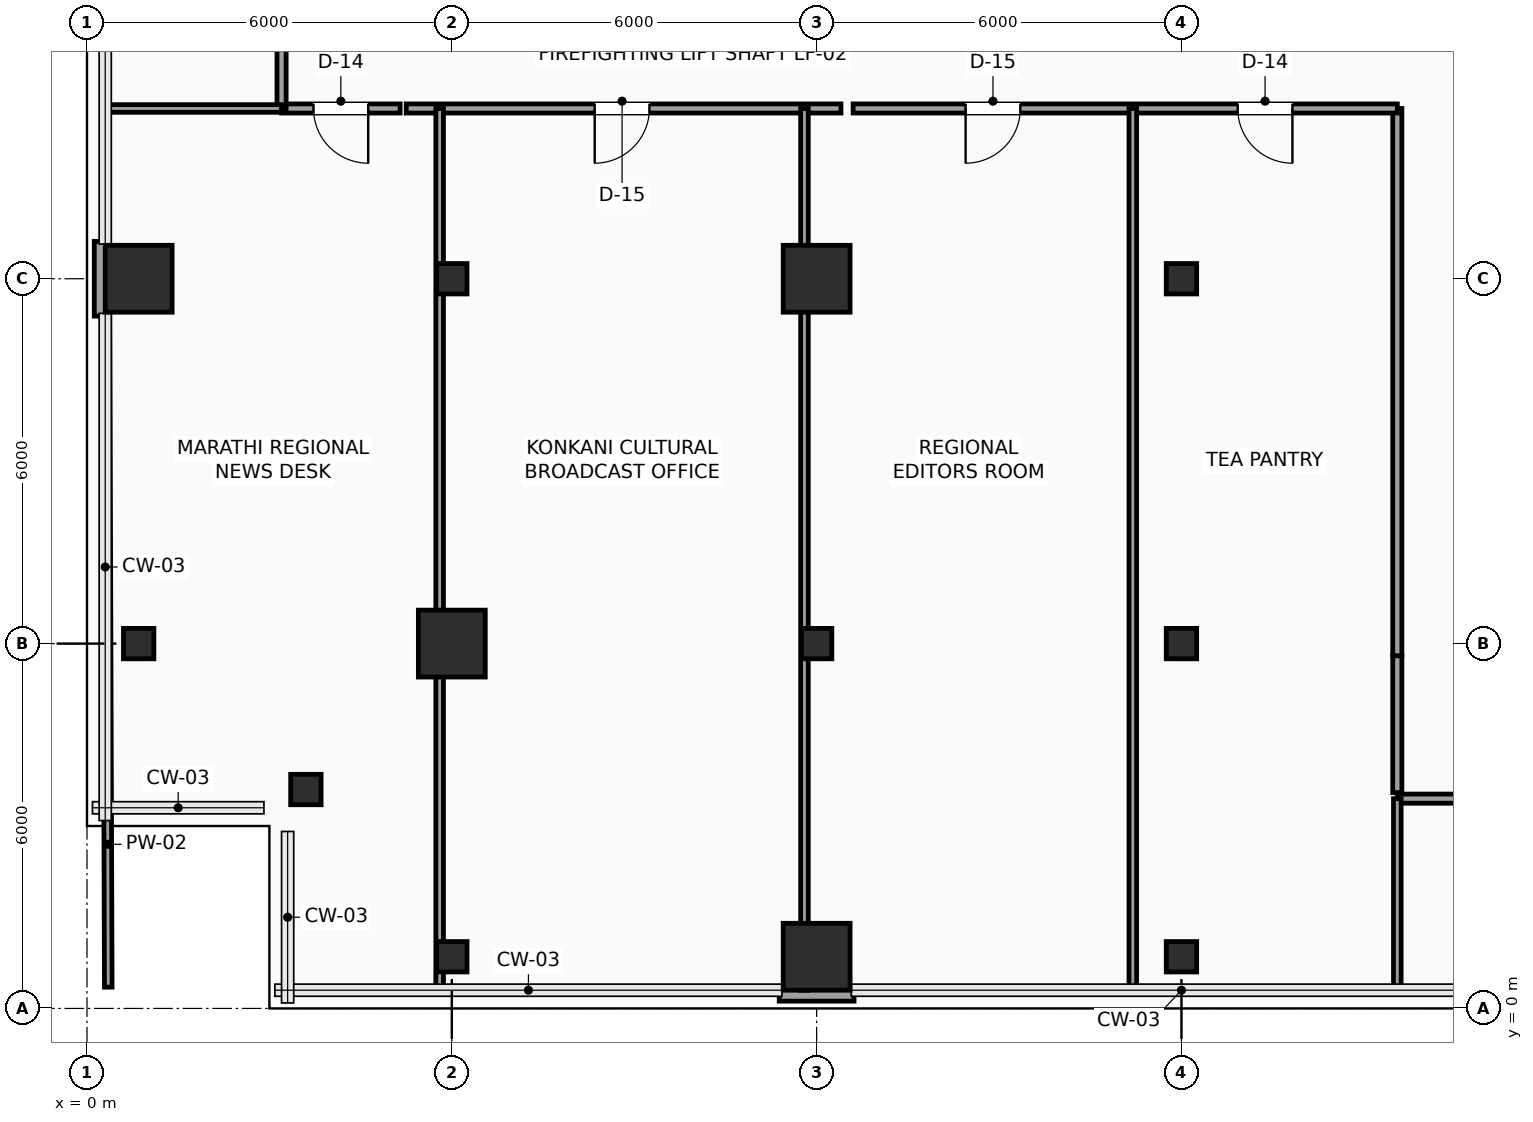
"""IFC4 building model, lengths in metres.
Left out: names, types, materials, properties, quantities, classifications, styles, units other than length and angle.
Written with IfcOpenShell. Run it as: python <this file> out.ifc"""

import sys

from ifc_helpers import new_model, si_unit, direction, frame, frame_2d, origin, origin_2d, place, context, subcontext, project, spatial, rectangle, hollow_rectangle, extrude, element, fill, save


model = new_model("IFC4")
c1 = context("Model", 3, precision=1e-05, world=origin(), true_north=direction((0.0, 1.0)))
c2 = subcontext(c1, "Body", "Model", "MODEL_VIEW")
j1 = project(units=[si_unit("LENGTHUNIT", "METRE"), si_unit("PLANEANGLEUNIT", "RADIAN")], contexts=[c1])
p1 = place(None, origin())
s1 = spatial("IfcSite", under=j1, at=p1, CompositionType="ELEMENT")
p2 = place(p1, origin())
s2 = spatial("IfcBuilding", under=s1, at=p2, CompositionType="ELEMENT")
p3 = place(p2, frame((0.0, 0.0, 103.35)))
s3 = spatial("IfcBuildingStorey", under=s2, at=p3, CompositionType="ELEMENT", Elevation=103.35)
for number, where, z_axis, x_axis in (
    (1, (3.6, 3.6, 0.0), (0.0, 0.0, 1.0), (1.0, 0.0, 0.0)),
    (2, (0.85, 6.0, 0.0), (0.0, 0.0, 1.0), (1.0, 0.0, 0.0)),
):
    element("IfcColumn", number, at=place(p3, frame(where, z_axis=z_axis, x_axis=x_axis)), inside=s3, PredefinedType="COLUMN", context=c2, shape_type="SweptSolid", body=[
        extrude(hollow_rectangle(XDim=0.5, YDim=0.5, WallThickness=0.025, InnerFilletRadius=0.025, OuterFilletRadius=0.04, at=origin_2d()), origin(), (0.0, 0.0, 1.0), 3.75),
    ])
p4 = place(p3, frame((0.85, 12.0, 0.0), z_axis=(0.0, 0.0, 1.0), x_axis=(1.0, 0.0, 0.0)))
e3 = element("IfcColumn", 3, at=p4, inside=s3, PredefinedType="COLUMN", context=c2, shape_type="SweptSolid", body=[
    extrude(rectangle(XDim=1.1, YDim=1.1, at=origin_2d()), origin(), (0.0, 0.0, 1.0), 3.75),
])
p5 = place(p3, frame((6.0, 0.85, 0.0), z_axis=(0.0, 0.0, 1.0), x_axis=(1.0, 0.0, 0.0)))
e4 = element("IfcColumn", 4, at=p5, inside=s3, PredefinedType="COLUMN", context=c2, shape_type="SweptSolid", body=[
    extrude(hollow_rectangle(XDim=0.5, YDim=0.5, WallThickness=0.025, InnerFilletRadius=0.025, OuterFilletRadius=0.04, at=origin_2d()), origin(), (0.0, 0.0, 1.0), 3.75),
])
p6 = place(p3, frame((6.0, 6.0, 0.0), z_axis=(0.0, 0.0, 1.0), x_axis=(1.0, 0.0, 0.0)))
e5 = element("IfcColumn", 5, at=p6, inside=s3, PredefinedType="COLUMN", context=c2, shape_type="SweptSolid", body=[
    extrude(rectangle(XDim=1.1, YDim=1.1, at=origin_2d()), origin(), (0.0, 0.0, 1.0), 3.75),
])
p7 = place(p3, frame((6.0, 12.0, 0.0), z_axis=(0.0, 0.0, 1.0), x_axis=(1.0, 0.0, 0.0)))
e6 = element("IfcColumn", 6, at=p7, inside=s3, PredefinedType="COLUMN", context=c2, shape_type="SweptSolid", body=[
    extrude(hollow_rectangle(XDim=0.5, YDim=0.5, WallThickness=0.025, InnerFilletRadius=0.025, OuterFilletRadius=0.04, at=origin_2d()), origin(), (0.0, 0.0, 1.0), 3.75),
])
p8 = place(p3, frame((12.0, 0.85, 0.0), z_axis=(0.0, 0.0, 1.0), x_axis=(1.0, 0.0, 0.0)))
e7 = element("IfcColumn", 7, at=p8, inside=s3, PredefinedType="COLUMN", context=c2, shape_type="SweptSolid", body=[
    extrude(rectangle(XDim=1.1, YDim=1.1, at=origin_2d()), origin(), (0.0, 0.0, 1.0), 3.75),
])
p9 = place(p3, frame((12.0, 6.0, 0.0), z_axis=(0.0, 0.0, 1.0), x_axis=(1.0, 0.0, 0.0)))
e8 = element("IfcColumn", 8, at=p9, inside=s3, PredefinedType="COLUMN", context=c2, shape_type="SweptSolid", body=[
    extrude(hollow_rectangle(XDim=0.5, YDim=0.5, WallThickness=0.025, InnerFilletRadius=0.025, OuterFilletRadius=0.04, at=origin_2d()), origin(), (0.0, 0.0, 1.0), 3.75),
])
p10 = place(p3, frame((12.0, 12.0, 0.0), z_axis=(0.0, 0.0, 1.0), x_axis=(1.0, 0.0, 0.0)))
e9 = element("IfcColumn", 9, at=p10, inside=s3, PredefinedType="COLUMN", context=c2, shape_type="SweptSolid", body=[
    extrude(rectangle(XDim=1.1, YDim=1.1, at=origin_2d()), origin(), (0.0, 0.0, 1.0), 3.75),
])
for number, where, z_axis, x_axis in (
    (10, (18.0, 0.85, 0.0), (0.0, 0.0, 1.0), (1.0, 0.0, 0.0)),
    (11, (18.0, 6.0, 0.0), (0.0, 0.0, 1.0), (1.0, 0.0, 0.0)),
    (12, (18.0, 12.0, 0.0), (0.0, 0.0, 1.0), (1.0, 0.0, 0.0)),
):
    element("IfcColumn", number, at=place(p3, frame(where, z_axis=z_axis, x_axis=x_axis)), inside=s3, PredefinedType="COLUMN", context=c2, shape_type="SweptSolid", body=[
        extrude(hollow_rectangle(XDim=0.5, YDim=0.5, WallThickness=0.025, InnerFilletRadius=0.025, OuterFilletRadius=0.04, at=origin_2d()), origin(), (0.0, 0.0, 1.0), 3.75),
    ])
for number, where, z_axis, x_axis in (
    (13, (0.24, 11.385, 0.0), (0.0, 0.0, 1.0), (0.0, 1.0, 0.0)),
    (14, (12.615, 0.24, 0.0), (0.0, 0.0, 1.0), (-1.0, 0.0, 0.0)),
):
    element("IfcWall", number, at=place(p3, frame(where, z_axis=z_axis, x_axis=x_axis)), inside=s3, PredefinedType="SOLIDWALL", context=c2, shape_type="SweptSolid", body=[
        extrude(rectangle(XDim=1.23, YDim=0.24, at=frame_2d((0.615, 0.0))), origin(), (0.0, 0.0, 1.0), 3.525),
    ])
p11 = place(p3, frame((36.15, 3.45, 0.0), z_axis=(0.0, 0.0, 1.0), x_axis=(-1.0, 0.0, 0.0)))
e15 = element("IfcWall", 15, at=p11, inside=s3, PredefinedType="PARTITIONING", context=c2, shape_type="SweptSolid", body=[
    extrude(rectangle(XDim=14.6, YDim=0.15, at=frame_2d((7.3, 0.0))), origin(), (0.0, 0.0, 1.0), 3.067),
])
p12 = place(p11, frame((11.325, 0.0, 0.0)))
e16 = element("IfcOpeningElement", 16, at=p12, cuts=e15, PredefinedType="OPENING", context=c2, shape_type="SweptSolid", body=[
    extrude(rectangle(XDim=0.9, YDim=2.1, at=frame_2d((0.45, 1.05))), frame((0.0, 0.085, 0.0), z_axis=(0.0, -1.0, 0.0), x_axis=(1.0, 0.0, 0.0)), (0.0, 0.0, 1.0), 0.17),
])
p13 = place(p11, frame((5.7, 0.0, 0.0)))
e17 = element("IfcOpeningElement", 17, at=p13, cuts=e15, PredefinedType="OPENING", context=c2, shape_type="SweptSolid", body=[
    extrude(rectangle(XDim=0.9, YDim=2.1, at=frame_2d((0.45, 1.05))), frame((0.0, 0.085, 0.0), z_axis=(0.0, -1.0, 0.0), x_axis=(1.0, 0.0, 0.0)), (0.0, 0.0, 1.0), 0.17),
])
p14 = place(p3, frame((21.55, 3.55, 0.0), z_axis=(0.0, 0.0, 1.0), x_axis=(0.0, 1.0, 0.0)))
e18 = element("IfcWall", 18, at=p14, inside=s3, PredefinedType="PARTITIONING", context=c2, shape_type="SweptSolid", body=[
    extrude(rectangle(XDim=2.25, YDim=0.15, at=frame_2d((1.125, 0.0))), origin(), (0.0, 0.0, 1.0), 3.525),
])
p15 = place(p3, frame((21.55, 5.8, 0.0), z_axis=(0.0, 0.0, 1.0), x_axis=(0.0, 1.0, 0.0)))
e19 = element("IfcWall", 19, at=p15, inside=s3, PredefinedType="PARTITIONING", context=c2, shape_type="SweptSolid", body=[
    extrude(rectangle(XDim=9.0, YDim=0.15, at=frame_2d((4.5, 0.0))), origin(), (0.0, 0.0, 1.0), 3.525),
])
p16 = place(p3, frame((21.55, 14.8, 0.0), z_axis=(0.0, 0.0, 1.0), x_axis=(-1.0, 0.0, 0.0)))
e20 = element("IfcWall", 20, at=p16, inside=s3, PredefinedType="PARTITIONING", context=c2, shape_type="SweptSolid", body=[
    extrude(rectangle(XDim=8.95, YDim=0.15, at=frame_2d((4.475, 0.0))), origin(), (0.0, 0.0, 1.0), 3.067),
])
p17 = place(p16, frame((6.2, 0.0, 0.0)))
e21 = element("IfcOpeningElement", 21, at=p17, cuts=e20, PredefinedType="OPENING", context=c2, shape_type="SweptSolid", body=[
    extrude(rectangle(XDim=0.9, YDim=2.1, at=frame_2d((0.45, 1.05))), frame((0.0, 0.085, 0.0), z_axis=(0.0, -1.0, 0.0), x_axis=(1.0, 0.0, 0.0)), (0.0, 0.0, 1.0), 0.17),
])
p18 = place(p16, frame((1.725, 0.0, 0.0)))
e22 = element("IfcOpeningElement", 22, at=p18, cuts=e20, PredefinedType="OPENING", context=c2, shape_type="SweptSolid", body=[
    extrude(rectangle(XDim=0.9, YDim=2.1, at=frame_2d((0.45, 1.05))), frame((0.0, 0.085, 0.0), z_axis=(0.0, -1.0, 0.0), x_axis=(1.0, 0.0, 0.0)), (0.0, 0.0, 1.0), 0.17),
])
p19 = place(p3, frame((12.4, 14.8, 0.0), z_axis=(0.0, 0.0, 1.0), x_axis=(-1.0, 0.0, 0.0)))
e23 = element("IfcWall", 23, at=p19, inside=s3, PredefinedType="PARTITIONING", context=c2, shape_type="SweptSolid", body=[
    extrude(rectangle(XDim=7.15, YDim=0.15, at=frame_2d((3.575, 0.0))), origin(), (0.0, 0.0, 1.0), 3.067),
])
p20 = place(p19, frame((3.15, 0.0, 0.0)))
e24 = element("IfcOpeningElement", 24, at=p20, cuts=e23, PredefinedType="OPENING", context=c2, shape_type="SweptSolid", body=[
    extrude(rectangle(XDim=0.9, YDim=2.1, at=frame_2d((0.45, 1.05))), frame((0.0, 0.085, 0.0), z_axis=(0.0, -1.0, 0.0), x_axis=(1.0, 0.0, 0.0)), (0.0, 0.0, 1.0), 0.17),
])
p21 = place(p3, frame((5.15, 14.8, 0.0), z_axis=(0.0, 0.0, 1.0), x_axis=(-1.0, 0.0, 0.0)))
e25 = element("IfcWall", 25, at=p21, inside=s3, PredefinedType="PARTITIONING", context=c2, shape_type="SweptSolid", body=[
    extrude(rectangle(XDim=1.95, YDim=0.15, at=frame_2d((0.975, 0.0))), origin(), (0.0, 0.0, 1.0), 3.067),
])
p22 = place(p21, frame((0.525, 0.0, 0.0)))
e26 = element("IfcOpeningElement", 26, at=p22, cuts=e25, PredefinedType="OPENING", context=c2, shape_type="SweptSolid", body=[
    extrude(rectangle(XDim=0.9, YDim=2.1, at=frame_2d((0.45, 1.05))), frame((0.0, 0.085, 0.0), z_axis=(0.0, -1.0, 0.0), x_axis=(1.0, 0.0, 0.0)), (0.0, 0.0, 1.0), 0.17),
])
p23 = place(p3, frame((3.2, 14.8, 0.0), z_axis=(0.0, 0.0, 1.0), x_axis=(0.0, 1.0, 0.0)))
e27 = element("IfcWall", 27, at=p23, inside=s3, PredefinedType="PARTITIONING", context=c2, shape_type="SweptSolid", body=[
    extrude(rectangle(XDim=15.45, YDim=0.15, at=frame_2d((7.725, 0.0))), origin(), (0.0, 0.0, 1.0), 3.525),
])
p24 = place(p23, frame((2.65, 0.0, 0.0)))
e28 = element("IfcOpeningElement", 28, at=p24, cuts=e27, PredefinedType="OPENING", context=c2, shape_type="SweptSolid", body=[
    extrude(rectangle(XDim=0.9, YDim=2.1, at=frame_2d((0.45, 1.05))), frame((0.0, 0.085, 0.0), z_axis=(0.0, -1.0, 0.0), x_axis=(1.0, 0.0, 0.0)), (0.0, 0.0, 1.0), 0.17),
])
p25 = place(p23, frame((8.85, 0.0, 0.0)))
e29 = element("IfcOpeningElement", 29, at=p25, cuts=e27, PredefinedType="OPENING", context=c2, shape_type="SweptSolid", body=[
    extrude(rectangle(XDim=0.9, YDim=2.1, at=frame_2d((0.45, 1.05))), frame((0.0, 0.085, 0.0), z_axis=(0.0, -1.0, 0.0), x_axis=(1.0, 0.0, 0.0)), (0.0, 0.0, 1.0), 0.17),
])
p26 = place(p23, frame((13.475, 0.0, 0.0)))
e30 = element("IfcOpeningElement", 30, at=p26, cuts=e27, PredefinedType="OPENING", context=c2, shape_type="SweptSolid", body=[
    extrude(rectangle(XDim=0.9, YDim=2.1, at=frame_2d((0.45, 1.05))), frame((0.0, 0.085, 0.0), z_axis=(0.0, -1.0, 0.0), x_axis=(1.0, 0.0, 0.0)), (0.0, 0.0, 1.0), 0.17),
])
p27 = place(p3, frame((0.35, 0.35, 0.0), z_axis=(0.0, 0.0, 1.0), x_axis=(-0.003473507221, 0.999993967356, 0.0)))
e31 = element("IfcWall", 31, at=p27, inside=s3, PredefinedType="PARTITIONING", context=c2, shape_type="SweptSolid", body=[
    extrude(rectangle(XDim=11.035, YDim=0.125, at=frame_2d((5.518, 0.0))), origin(), (0.0, 0.0, 1.0), 3.525),
])
p28 = place(p3, frame((0.308, 12.615, 0.0), z_axis=(0.0, 0.0, 1.0), x_axis=(-0.003463666374, 0.99999400149, 0.0)))
e32 = element("IfcWall", 32, at=p28, inside=s3, PredefinedType="PARTITIONING", context=c2, shape_type="SweptSolid", body=[
    extrude(rectangle(XDim=2.185, YDim=0.125, at=frame_2d((1.093, 0.0))), origin(), (0.0, 0.0, 1.0), 3.525),
])
for number, where, z_axis, x_axis in (
    (33, (5.8, 0.3, 0.0), (0.0, 0.0, 1.0), (0.0, 1.0, 0.0)),
    (34, (11.8, 0.3, 0.0), (0.0, 0.0, 1.0), (0.0, 1.0, 0.0)),
):
    element("IfcWall", number, at=place(p3, frame(where, z_axis=z_axis, x_axis=x_axis)), inside=s3, PredefinedType="PARTITIONING", context=c2, shape_type="SweptSolid", body=[
        extrude(rectangle(XDim=14.5, YDim=0.125, at=frame_2d((7.25, 0.0))), origin(), (0.0, 0.0, 1.0), 3.017),
    ])
p29 = place(p3, frame((17.2, 0.3, 0.0), z_axis=(0.0, 0.0, 1.0), x_axis=(0.0, 1.0, 0.0)))
e35 = element("IfcWall", 35, at=p29, inside=s3, PredefinedType="PARTITIONING", context=c2, shape_type="SweptSolid", body=[
    extrude(rectangle(XDim=14.5, YDim=0.125, at=frame_2d((7.25, 0.0))), origin(), (0.0, 0.0, 1.0), 3.525),
])
p30 = place(p3, frame((0.3, 14.8, 0.0), z_axis=(0.0, 0.0, 1.0), x_axis=(1.0, 0.0, 0.0)))
e36 = element("IfcWall", 36, at=p30, inside=s3, PredefinedType="PARTITIONING", context=c2, shape_type="SweptSolid", body=[
    extrude(rectangle(XDim=2.9, YDim=0.125, at=frame_2d((1.45, 0.0))), origin(), (0.0, 0.0, 1.0), 3.067),
])
p31 = place(p3, frame((21.55, 0.3, 0.0), z_axis=(0.0, 0.0, 1.0), x_axis=(0.0, 1.0, 0.0)))
e37 = element("IfcWall", 37, at=p31, inside=s3, PredefinedType="PARTITIONING", context=c2, shape_type="SweptSolid", body=[
    extrude(rectangle(XDim=3.15, YDim=0.125, at=frame_2d((1.575, 0.0))), origin(), (0.0, 0.0, 1.0), 3.525),
])
p32 = place(p17, origin())
e38 = element("IfcDoor", 38, at=p32, inside=s3, OperationType="SINGLE_SWING_RIGHT", PredefinedType="DOOR", context=c2, shape_type="SweptSolid", body=[
    extrude(rectangle(XDim=0.9, YDim=2.1, at=frame_2d((0.45, 1.05))), frame((0.0, 0.025, 0.0), z_axis=(0.0, -1.0, 0.0), x_axis=(1.0, 0.0, 0.0)), (0.0, 0.0, 1.0), 0.05),
])
fill(e21, e38)
p33 = place(p18, origin())
e39 = element("IfcDoor", 39, at=p33, inside=s3, OperationType="SINGLE_SWING_LEFT", PredefinedType="DOOR", context=c2, shape_type="SweptSolid", body=[
    extrude(rectangle(XDim=0.9, YDim=2.1, at=frame_2d((0.45, 1.05))), frame((0.0, 0.025, 0.0), z_axis=(0.0, -1.0, 0.0), x_axis=(1.0, 0.0, 0.0)), (0.0, 0.0, 1.0), 0.05),
])
fill(e22, e39)
p34 = place(p20, origin())
e40 = element("IfcDoor", 40, at=p34, inside=s3, OperationType="SINGLE_SWING_RIGHT", PredefinedType="DOOR", context=c2, shape_type="SweptSolid", body=[
    extrude(rectangle(XDim=0.9, YDim=2.1, at=frame_2d((0.45, 1.05))), frame((0.0, 0.025, 0.0), z_axis=(0.0, -1.0, 0.0), x_axis=(1.0, 0.0, 0.0)), (0.0, 0.0, 1.0), 0.05),
])
fill(e24, e40)
p35 = place(p22, origin())
e41 = element("IfcDoor", 41, at=p35, inside=s3, OperationType="SINGLE_SWING_LEFT", PredefinedType="DOOR", context=c2, shape_type="SweptSolid", body=[
    extrude(rectangle(XDim=0.9, YDim=2.1, at=frame_2d((0.45, 1.05))), frame((0.0, 0.025, 0.0), z_axis=(0.0, -1.0, 0.0), x_axis=(1.0, 0.0, 0.0)), (0.0, 0.0, 1.0), 0.05),
])
fill(e26, e41)
save(model, sys.argv[1])
